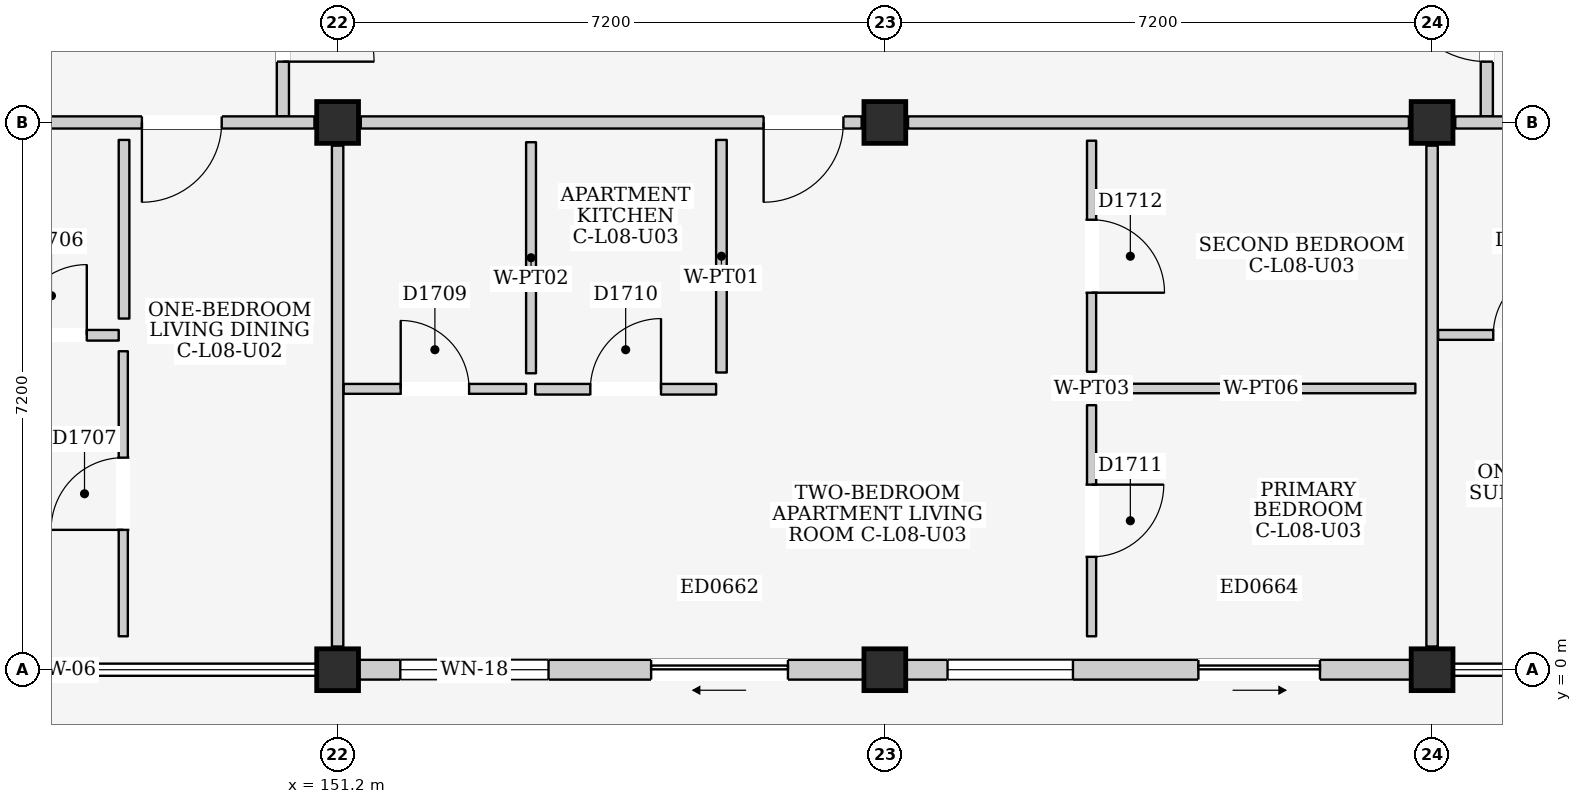
"""IFC4 building model, lengths in metres.
Left out: names, types, materials, properties, quantities, classifications, styles, units other than length and angle.
Written with IfcOpenShell. Run it as: python <this file> out.ifc"""

import sys

from ifc_helpers import new_model, si_unit, direction, frame, frame_2d, origin, origin_2d, place, context, subcontext, project, spatial, rectangle, extrude, element, fill, save


model = new_model("IFC4")
c1 = context("Model", 3, precision=1e-05, world=origin(), true_north=direction((0.0, 1.0)))
c2 = subcontext(c1, "Body", "Model", "MODEL_VIEW")
j1 = project(units=[si_unit("LENGTHUNIT", "METRE"), si_unit("PLANEANGLEUNIT", "RADIAN")], contexts=[c1])
p1 = place(None, origin())
s1 = spatial("IfcSite", under=j1, at=p1, CompositionType="ELEMENT")
p2 = place(p1, origin())
s2 = spatial("IfcBuilding", under=s1, at=p2, CompositionType="ELEMENT")
p3 = place(p2, frame((0.0, 0.0, 28.3)))
s3 = spatial("IfcBuildingStorey", under=s2, at=p3, CompositionType="ELEMENT", Elevation=28.3)
for number, where, z_axis, x_axis in (
    (1, (151.2, 0.0, 0.0), (0.0, 0.0, 1.0), (1.0, 0.0, 0.0)),
    (2, (151.2, 7.2, 0.0), (0.0, 0.0, 1.0), (1.0, 0.0, 0.0)),
    (3, (158.4, 0.0, 0.0), (0.0, 0.0, 1.0), (1.0, 0.0, 0.0)),
    (4, (158.4, 7.2, 0.0), (0.0, 0.0, 1.0), (1.0, 0.0, 0.0)),
    (5, (165.6, 0.0, 0.0), (0.0, 0.0, 1.0), (1.0, 0.0, 0.0)),
    (6, (165.6, 7.2, 0.0), (0.0, 0.0, 1.0), (1.0, 0.0, 0.0)),
):
    element("IfcColumn", number, at=place(p3, frame(where, z_axis=z_axis, x_axis=x_axis)), inside=s3, PredefinedType="COLUMN", context=c2, shape_type="SweptSolid", body=[
        extrude(rectangle(XDim=0.55, YDim=0.55, at=origin_2d()), origin(), (0.0, 0.0, 1.0), 3.2),
    ])
p4 = place(p3, frame((151.475, 0.0, 0.0), z_axis=(0.0, 0.0, 1.0), x_axis=(1.0, 0.0, 0.0)))
e7 = element("IfcWall", 7, at=p4, inside=s3, PredefinedType="ELEMENTEDWALL", context=c2, shape_type="SweptSolid", body=[
    extrude(rectangle(XDim=6.65, YDim=0.26, at=frame_2d((3.325, 0.0))), origin(), (0.0, 0.0, 1.0), 2.485),
])
p5 = place(p4, frame((3.85, 0.0, 0.0)))
e8 = element("IfcOpeningElement", 8, at=p5, cuts=e7, PredefinedType="OPENING", context=c2, shape_type="SweptSolid", body=[
    extrude(rectangle(XDim=1.8, YDim=2.12, at=frame_2d((0.9, 1.06))), frame((0.0, 0.145, 0.0), z_axis=(0.0, -1.0, 0.0), x_axis=(1.0, 0.0, 0.0)), (0.0, 0.0, 1.0), 0.29),
])
p6 = place(p4, frame((0.55, 0.0, 0.825)))
e9 = element("IfcOpeningElement", 9, at=p6, cuts=e7, PredefinedType="OPENING", context=c2, shape_type="SweptSolid", body=[
    extrude(rectangle(XDim=1.95, YDim=1.55, at=frame_2d((0.975, 0.775))), frame((0.0, 0.145, 0.0), z_axis=(0.0, -1.0, 0.0), x_axis=(1.0, 0.0, 0.0)), (0.0, 0.0, 1.0), 0.29),
])
p7 = place(p3, frame((158.675, 0.0, 0.0), z_axis=(0.0, 0.0, 1.0), x_axis=(1.0, 0.0, 0.0)))
e10 = element("IfcWall", 10, at=p7, inside=s3, PredefinedType="ELEMENTEDWALL", context=c2, shape_type="SweptSolid", body=[
    extrude(rectangle(XDim=6.65, YDim=0.26, at=frame_2d((3.325, 0.0))), origin(), (0.0, 0.0, 1.0), 2.485),
])
p8 = place(p7, frame((3.85, 0.0, 0.0)))
e11 = element("IfcOpeningElement", 11, at=p8, cuts=e10, PredefinedType="OPENING", context=c2, shape_type="SweptSolid", body=[
    extrude(rectangle(XDim=1.6, YDim=2.12, at=frame_2d((0.8, 1.06))), frame((0.0, 0.145, 0.0), z_axis=(0.0, -1.0, 0.0), x_axis=(1.0, 0.0, 0.0)), (0.0, 0.0, 1.0), 0.29),
])
p9 = place(p7, frame((0.55, 0.0, 0.9)))
e12 = element("IfcOpeningElement", 12, at=p9, cuts=e10, PredefinedType="OPENING", context=c2, shape_type="SweptSolid", body=[
    extrude(rectangle(XDim=1.65, YDim=1.35, at=frame_2d((0.825, 0.675))), frame((0.0, 0.145, 0.0), z_axis=(0.0, -1.0, 0.0), x_axis=(1.0, 0.0, 0.0)), (0.0, 0.0, 1.0), 0.29),
])
p10 = place(p3, frame((150.48, 7.28, 0.0), z_axis=(0.0, 0.0, 1.0), x_axis=(0.0, 1.0, 0.0)))
e13 = element("IfcWall", 13, at=p10, inside=s3, PredefinedType="PARTITIONING", context=c2, shape_type="SweptSolid", body=[
    extrude(rectangle(XDim=4.32, YDim=0.16, at=frame_2d((2.16, 0.0))), origin(), (0.0, 0.0, 1.0), 2.95),
])
p11 = place(p10, frame((0.72, 0.0, 0.0)))
e14 = element("IfcOpeningElement", 14, at=p11, cuts=e13, PredefinedType="OPENING", context=c2, shape_type="SweptSolid", body=[
    extrude(rectangle(XDim=1.2, YDim=2.2, at=frame_2d((0.6, 1.1))), frame((0.0, 0.095, 0.0), z_axis=(0.0, -1.0, 0.0), x_axis=(1.0, 0.0, 0.0)), (0.0, 0.0, 1.0), 0.19),
])
p12 = place(p3, frame((166.32, 7.28, 0.0), z_axis=(0.0, 0.0, 1.0), x_axis=(0.0, 1.0, 0.0)))
e15 = element("IfcWall", 15, at=p12, inside=s3, PredefinedType="PARTITIONING", context=c2, shape_type="SweptSolid", body=[
    extrude(rectangle(XDim=4.32, YDim=0.16, at=frame_2d((2.16, 0.0))), origin(), (0.0, 0.0, 1.0), 2.95),
])
p13 = place(p12, frame((0.72, 0.0, 0.0)))
e16 = element("IfcOpeningElement", 16, at=p13, cuts=e15, PredefinedType="OPENING", context=c2, shape_type="SweptSolid", body=[
    extrude(rectangle(XDim=1.2, YDim=2.2, at=frame_2d((0.6, 1.1))), frame((0.0, 0.095, 0.0), z_axis=(0.0, -1.0, 0.0), x_axis=(1.0, 0.0, 0.0)), (0.0, 0.0, 1.0), 0.19),
])
p14 = place(p3, frame((144.305, 7.2, 0.0), z_axis=(0.0, 0.0, 1.0), x_axis=(1.0, 0.0, 0.0)))
e17 = element("IfcWall", 17, at=p14, inside=s3, PredefinedType="PARTITIONING", context=c2, shape_type="SweptSolid", body=[
    extrude(rectangle(XDim=6.59, YDim=0.16, at=frame_2d((3.295, 0.0))), origin(), (0.0, 0.0, 1.0), 2.335),
])
p15 = place(p14, frame((4.32, 0.0, 0.0)))
e18 = element("IfcOpeningElement", 18, at=p15, cuts=e17, PredefinedType="OPENING", context=c2, shape_type="SweptSolid", body=[
    extrude(rectangle(XDim=1.05, YDim=2.15, at=frame_2d((0.525, 1.075))), frame((0.0, 0.095, 0.0), z_axis=(0.0, -1.0, 0.0), x_axis=(1.0, 0.0, 0.0)), (0.0, 0.0, 1.0), 0.19),
])
p16 = place(p3, frame((151.2, 0.305, 0.0), z_axis=(0.0, 0.0, 1.0), x_axis=(0.0, 1.0, 0.0)))
e19 = element("IfcWall", 19, at=p16, inside=s3, PredefinedType="PARTITIONING", context=c2, shape_type="SweptSolid", body=[
    extrude(rectangle(XDim=6.59, YDim=0.15, at=frame_2d((3.295, 0.0))), origin(), (0.0, 0.0, 1.0), 2.435),
])
p17 = place(p3, frame((146.55, 4.4, 0.0), z_axis=(0.0, 0.0, 1.0), x_axis=(1.0, 0.0, 0.0)))
e20 = element("IfcWall", 20, at=p17, inside=s3, PredefinedType="PARTITIONING", context=c2, shape_type="SweptSolid", body=[
    extrude(rectangle(XDim=1.77, YDim=0.14, at=frame_2d((0.885, 0.0))), origin(), (0.0, 0.0, 1.0), 2.95),
])
p18 = place(p17, frame((0.42, 0.0, 0.0)))
e21 = element("IfcOpeningElement", 21, at=p18, cuts=e20, PredefinedType="OPENING", context=c2, shape_type="SweptSolid", body=[
    extrude(rectangle(XDim=0.93, YDim=2.14, at=frame_2d((0.465, 1.07))), frame((0.0, 0.085, 0.0), z_axis=(0.0, -1.0, 0.0), x_axis=(1.0, 0.0, 0.0)), (0.0, 0.0, 1.0), 0.17),
])
p19 = place(p3, frame((148.39, 4.62, 0.0), z_axis=(0.0, 0.0, 1.0), x_axis=(0.0, 1.0, 0.0)))
e22 = element("IfcWall", 22, at=p19, inside=s3, PredefinedType="PARTITIONING", context=c2, shape_type="SweptSolid", body=[
    extrude(rectangle(XDim=2.35, YDim=0.14, at=frame_2d((1.175, 0.0))), origin(), (0.0, 0.0, 1.0), 2.95),
])
p20 = place(p3, frame((148.38, 0.44, 0.0), z_axis=(0.0, 0.0, 1.0), x_axis=(0.0, 1.0, 0.0)))
e23 = element("IfcWall", 23, at=p20, inside=s3, PredefinedType="PARTITIONING", context=c2, shape_type="SweptSolid", body=[
    extrude(rectangle(XDim=3.75, YDim=0.12, at=frame_2d((1.875, 0.0))), origin(), (0.0, 0.0, 1.0), 2.95),
])
p21 = place(p20, frame((1.4, 0.0, 0.0)))
e24 = element("IfcOpeningElement", 24, at=p21, cuts=e23, PredefinedType="OPENING", context=c2, shape_type="SweptSolid", body=[
    extrude(rectangle(XDim=0.95, YDim=2.15, at=frame_2d((0.475, 1.075))), frame((0.0, 0.075, 0.0), z_axis=(0.0, -1.0, 0.0), x_axis=(1.0, 0.0, 0.0)), (0.0, 0.0, 1.0), 0.15),
])
p22 = place(p3, frame((151.505, 7.2, 0.0), z_axis=(0.0, 0.0, 1.0), x_axis=(1.0, 0.0, 0.0)))
e25 = element("IfcWall", 25, at=p22, inside=s3, PredefinedType="PARTITIONING", context=c2, shape_type="SweptSolid", body=[
    extrude(rectangle(XDim=6.59, YDim=0.16, at=frame_2d((3.295, 0.0))), origin(), (0.0, 0.0, 1.0), 2.335),
])
p23 = place(p22, frame((5.3, 0.0, 0.0)))
e26 = element("IfcOpeningElement", 26, at=p23, cuts=e25, PredefinedType="OPENING", context=c2, shape_type="SweptSolid", body=[
    extrude(rectangle(XDim=1.05, YDim=2.15, at=frame_2d((0.525, 1.075))), frame((0.0, 0.095, 0.0), z_axis=(0.0, -1.0, 0.0), x_axis=(1.0, 0.0, 0.0)), (0.0, 0.0, 1.0), 0.19),
])
p24 = place(p3, frame((158.705, 7.2, 0.0), z_axis=(0.0, 0.0, 1.0), x_axis=(1.0, 0.0, 0.0)))
e27 = element("IfcWall", 27, at=p24, inside=s3, PredefinedType="PARTITIONING", context=c2, shape_type="SweptSolid", body=[
    extrude(rectangle(XDim=6.59, YDim=0.16, at=frame_2d((3.295, 0.0))), origin(), (0.0, 0.0, 1.0), 2.335),
])
p25 = place(p3, frame((165.6, 0.305, 0.0), z_axis=(0.0, 0.0, 1.0), x_axis=(0.0, 1.0, 0.0)))
e28 = element("IfcWall", 28, at=p25, inside=s3, PredefinedType="PARTITIONING", context=c2, shape_type="SweptSolid", body=[
    extrude(rectangle(XDim=6.59, YDim=0.15, at=frame_2d((3.295, 0.0))), origin(), (0.0, 0.0, 1.0), 2.435),
])
p26 = place(p3, frame((151.28, 3.695, 0.0), z_axis=(0.0, 0.0, 1.0), x_axis=(1.0, 0.0, 0.0)))
e29 = element("IfcWall", 29, at=p26, inside=s3, PredefinedType="PARTITIONING", context=c2, shape_type="SweptSolid", body=[
    extrude(rectangle(XDim=2.4, YDim=0.13, at=frame_2d((1.2, 0.0))), origin(), (0.0, 0.0, 1.0), 2.95),
])
p27 = place(p26, frame((0.75, 0.0, 0.0)))
e30 = element("IfcOpeningElement", 30, at=p27, cuts=e29, PredefinedType="OPENING", context=c2, shape_type="SweptSolid", body=[
    extrude(rectangle(XDim=0.9, YDim=2.1, at=frame_2d((0.45, 1.05))), frame((0.0, 0.08, 0.0), z_axis=(0.0, -1.0, 0.0), x_axis=(1.0, 0.0, 0.0)), (0.0, 0.0, 1.0), 0.16),
])
p28 = place(p3, frame((153.745, 3.9, 0.0), z_axis=(0.0, 0.0, 1.0), x_axis=(0.0, 1.0, 0.0)))
e31 = element("IfcWall", 31, at=p28, inside=s3, PredefinedType="PARTITIONING", context=c2, shape_type="SweptSolid", body=[
    extrude(rectangle(XDim=3.04, YDim=0.13, at=frame_2d((1.52, 0.0))), origin(), (0.0, 0.0, 1.0), 2.95),
])
p29 = place(p3, frame((153.8, 3.69, 0.0), z_axis=(0.0, 0.0, 1.0), x_axis=(1.0, 0.0, 0.0)))
e32 = element("IfcWall", 32, at=p29, inside=s3, PredefinedType="PARTITIONING", context=c2, shape_type="SweptSolid", body=[
    extrude(rectangle(XDim=2.38, YDim=0.14, at=frame_2d((1.19, 0.0))), origin(), (0.0, 0.0, 1.0), 2.95),
])
p30 = place(p29, frame((0.725, 0.0, 0.0)))
e33 = element("IfcOpeningElement", 33, at=p30, cuts=e32, PredefinedType="OPENING", context=c2, shape_type="SweptSolid", body=[
    extrude(rectangle(XDim=0.93, YDim=2.14, at=frame_2d((0.465, 1.07))), frame((0.0, 0.085, 0.0), z_axis=(0.0, -1.0, 0.0), x_axis=(1.0, 0.0, 0.0)), (0.0, 0.0, 1.0), 0.17),
])
p31 = place(p3, frame((156.25, 3.91, 0.0), z_axis=(0.0, 0.0, 1.0), x_axis=(0.0, 1.0, 0.0)))
e34 = element("IfcWall", 34, at=p31, inside=s3, PredefinedType="PARTITIONING", context=c2, shape_type="SweptSolid", body=[
    extrude(rectangle(XDim=3.06, YDim=0.14, at=frame_2d((1.53, 0.0))), origin(), (0.0, 0.0, 1.0), 2.95),
])
p32 = place(p3, frame((161.12, 0.44, 0.0), z_axis=(0.0, 0.0, 1.0), x_axis=(0.0, 1.0, 0.0)))
e35 = element("IfcWall", 35, at=p32, inside=s3, PredefinedType="PARTITIONING", context=c2, shape_type="SweptSolid", body=[
    extrude(rectangle(XDim=3.04, YDim=0.12, at=frame_2d((1.52, 0.0))), origin(), (0.0, 0.0, 1.0), 2.95),
])
p33 = place(p32, frame((1.045, 0.0, 0.0)))
e36 = element("IfcOpeningElement", 36, at=p33, cuts=e35, PredefinedType="OPENING", context=c2, shape_type="SweptSolid", body=[
    extrude(rectangle(XDim=0.95, YDim=2.15, at=frame_2d((0.475, 1.075))), frame((0.0, 0.075, 0.0), z_axis=(0.0, -1.0, 0.0), x_axis=(1.0, 0.0, 0.0)), (0.0, 0.0, 1.0), 0.15),
])
p34 = place(p3, frame((161.32, 3.7, 0.0), z_axis=(0.0, 0.0, 1.0), x_axis=(1.0, 0.0, 0.0)))
e37 = element("IfcWall", 37, at=p34, inside=s3, PredefinedType="PARTITIONING", context=c2, shape_type="SweptSolid", body=[
    extrude(rectangle(XDim=4.06, YDim=0.125, at=frame_2d((2.03, 0.0))), origin(), (0.0, 0.0, 1.0), 2.95),
])
p35 = place(p3, frame((161.12, 3.92, 0.0), z_axis=(0.0, 0.0, 1.0), x_axis=(0.0, 1.0, 0.0)))
e38 = element("IfcWall", 38, at=p35, inside=s3, PredefinedType="PARTITIONING", context=c2, shape_type="SweptSolid", body=[
    extrude(rectangle(XDim=3.04, YDim=0.12, at=frame_2d((1.52, 0.0))), origin(), (0.0, 0.0, 1.0), 2.95),
])
p36 = place(p35, frame((1.04, 0.0, 0.0)))
e39 = element("IfcOpeningElement", 39, at=p36, cuts=e38, PredefinedType="OPENING", context=c2, shape_type="SweptSolid", body=[
    extrude(rectangle(XDim=0.96, YDim=2.15, at=frame_2d((0.48, 1.075))), frame((0.0, 0.075, 0.0), z_axis=(0.0, -1.0, 0.0), x_axis=(1.0, 0.0, 0.0)), (0.0, 0.0, 1.0), 0.15),
])
p37 = place(p3, frame((165.905, 7.2, 0.0), z_axis=(0.0, 0.0, 1.0), x_axis=(1.0, 0.0, 0.0)))
e40 = element("IfcWall", 40, at=p37, inside=s3, PredefinedType="PARTITIONING", context=c2, shape_type="SweptSolid", body=[
    extrude(rectangle(XDim=6.59, YDim=0.16, at=frame_2d((3.295, 0.0))), origin(), (0.0, 0.0, 1.0), 2.335),
])
p38 = place(p37, frame((4.32, 0.0, 0.0)))
e41 = element("IfcOpeningElement", 41, at=p38, cuts=e40, PredefinedType="OPENING", context=c2, shape_type="SweptSolid", body=[
    extrude(rectangle(XDim=1.05, YDim=2.15, at=frame_2d((0.525, 1.075))), frame((0.0, 0.095, 0.0), z_axis=(0.0, -1.0, 0.0), x_axis=(1.0, 0.0, 0.0)), (0.0, 0.0, 1.0), 0.19),
])
p39 = place(p3, frame((165.68, 4.405, 0.0), z_axis=(0.0, 0.0, 1.0), x_axis=(1.0, 0.0, 0.0)))
e42 = element("IfcWall", 42, at=p39, inside=s3, PredefinedType="PARTITIONING", context=c2, shape_type="SweptSolid", body=[
    extrude(rectangle(XDim=2.35, YDim=0.13, at=frame_2d((1.175, 0.0))), origin(), (0.0, 0.0, 1.0), 2.95),
])
p40 = place(p39, frame((0.725, 0.0, 0.0)))
e43 = element("IfcOpeningElement", 43, at=p40, cuts=e42, PredefinedType="OPENING", context=c2, shape_type="SweptSolid", body=[
    extrude(rectangle(XDim=0.9, YDim=2.1, at=frame_2d((0.45, 1.05))), frame((0.0, 0.08, 0.0), z_axis=(0.0, -1.0, 0.0), x_axis=(1.0, 0.0, 0.0)), (0.0, 0.0, 1.0), 0.16),
])
p41 = place(p5, frame((1.8, 0.0, 0.0), z_axis=(0.0, 0.0, 1.0), x_axis=(-1.0, 0.0, 0.0)))
e44 = element("IfcDoor", 44, at=p41, inside=s3, OperationType="SLIDING_TO_LEFT", PredefinedType="DOOR", context=c2, shape_type="SweptSolid", body=[
    extrude(rectangle(XDim=1.8, YDim=2.12, at=frame_2d((0.9, 1.06))), frame((0.0, 0.025, 0.0), z_axis=(0.0, -1.0, 0.0), x_axis=(1.0, 0.0, 0.0)), (0.0, 0.0, 1.0), 0.05),
])
fill(e8, e44)
p42 = place(p6, origin())
e45 = element("IfcWindow", 45, at=p42, inside=s3, PartitioningType="DOUBLE_PANEL_VERTICAL", PredefinedType="WINDOW", context=c2, shape_type="SweptSolid", body=[
    extrude(rectangle(XDim=1.95, YDim=1.55, at=frame_2d((0.975, 0.775))), frame((0.0, 0.03, 0.0), z_axis=(0.0, -1.0, 0.0), x_axis=(1.0, 0.0, 0.0)), (0.0, 0.0, 1.0), 0.06),
])
fill(e9, e45)
p43 = place(p8, frame((1.6, 0.0, 0.0), z_axis=(0.0, 0.0, 1.0), x_axis=(-1.0, 0.0, 0.0)))
e46 = element("IfcDoor", 46, at=p43, inside=s3, OperationType="SLIDING_TO_RIGHT", PredefinedType="DOOR", context=c2, shape_type="SweptSolid", body=[
    extrude(rectangle(XDim=1.6, YDim=2.12, at=frame_2d((0.8, 1.06))), frame((0.0, 0.025, 0.0), z_axis=(0.0, -1.0, 0.0), x_axis=(1.0, 0.0, 0.0)), (0.0, 0.0, 1.0), 0.05),
])
fill(e11, e46)
p44 = place(p9, origin())
e47 = element("IfcWindow", 47, at=p44, inside=s3, PartitioningType="DOUBLE_PANEL_VERTICAL", PredefinedType="WINDOW", context=c2, shape_type="SweptSolid", body=[
    extrude(rectangle(XDim=1.65, YDim=1.35, at=frame_2d((0.825, 0.675))), frame((0.0, 0.03, 0.0), z_axis=(0.0, -1.0, 0.0), x_axis=(1.0, 0.0, 0.0)), (0.0, 0.0, 1.0), 0.06),
])
fill(e12, e47)
p45 = place(p11, frame((1.2, 0.0, 0.0), z_axis=(0.0, 0.0, 1.0), x_axis=(-1.0, 0.0, 0.0)))
e48 = element("IfcDoor", 48, at=p45, inside=s3, OperationType="SINGLE_SWING_RIGHT", PredefinedType="DOOR", context=c2, shape_type="SweptSolid", body=[
    extrude(rectangle(XDim=1.2, YDim=2.2, at=frame_2d((0.6, 1.1))), frame((0.0, 0.025, 0.0), z_axis=(0.0, -1.0, 0.0), x_axis=(1.0, 0.0, 0.0)), (0.0, 0.0, 1.0), 0.05),
])
fill(e14, e48)
p46 = place(p13, origin())
e49 = element("IfcDoor", 49, at=p46, inside=s3, OperationType="SINGLE_SWING_RIGHT", PredefinedType="DOOR", context=c2, shape_type="SweptSolid", body=[
    extrude(rectangle(XDim=1.2, YDim=2.2, at=frame_2d((0.6, 1.1))), frame((0.0, 0.025, 0.0), z_axis=(0.0, -1.0, 0.0), x_axis=(1.0, 0.0, 0.0)), (0.0, 0.0, 1.0), 0.05),
])
fill(e16, e49)
p47 = place(p15, frame((1.05, 0.0, 0.0), z_axis=(0.0, 0.0, 1.0), x_axis=(-1.0, 0.0, 0.0)))
e50 = element("IfcDoor", 50, at=p47, inside=s3, OperationType="SINGLE_SWING_RIGHT", PredefinedType="DOOR", context=c2, shape_type="SweptSolid", body=[
    extrude(rectangle(XDim=1.05, YDim=2.15, at=frame_2d((0.525, 1.075))), frame((0.0, 0.025, 0.0), z_axis=(0.0, -1.0, 0.0), x_axis=(1.0, 0.0, 0.0)), (0.0, 0.0, 1.0), 0.05),
])
fill(e18, e50)
p48 = place(p18, origin())
e51 = element("IfcDoor", 51, at=p48, inside=s3, OperationType="SINGLE_SWING_RIGHT", PredefinedType="DOOR", context=c2, shape_type="SweptSolid", body=[
    extrude(rectangle(XDim=0.93, YDim=2.14, at=frame_2d((0.465, 1.07))), frame((0.0, 0.025, 0.0), z_axis=(0.0, -1.0, 0.0), x_axis=(1.0, 0.0, 0.0)), (0.0, 0.0, 1.0), 0.05),
])
fill(e21, e51)
p49 = place(p21, origin())
e52 = element("IfcDoor", 52, at=p49, inside=s3, OperationType="SINGLE_SWING_LEFT", PredefinedType="DOOR", context=c2, shape_type="SweptSolid", body=[
    extrude(rectangle(XDim=0.95, YDim=2.15, at=frame_2d((0.475, 1.075))), frame((0.0, 0.025, 0.0), z_axis=(0.0, -1.0, 0.0), x_axis=(1.0, 0.0, 0.0)), (0.0, 0.0, 1.0), 0.05),
])
fill(e24, e52)
p50 = place(p23, frame((1.05, 0.0, 0.0), z_axis=(0.0, 0.0, 1.0), x_axis=(-1.0, 0.0, 0.0)))
e53 = element("IfcDoor", 53, at=p50, inside=s3, OperationType="SINGLE_SWING_RIGHT", PredefinedType="DOOR", context=c2, shape_type="SweptSolid", body=[
    extrude(rectangle(XDim=1.05, YDim=2.15, at=frame_2d((0.525, 1.075))), frame((0.0, 0.025, 0.0), z_axis=(0.0, -1.0, 0.0), x_axis=(1.0, 0.0, 0.0)), (0.0, 0.0, 1.0), 0.05),
])
fill(e26, e53)
p51 = place(p27, origin())
e54 = element("IfcDoor", 54, at=p51, inside=s3, OperationType="SINGLE_SWING_LEFT", PredefinedType="DOOR", context=c2, shape_type="SweptSolid", body=[
    extrude(rectangle(XDim=0.9, YDim=2.1, at=frame_2d((0.45, 1.05))), frame((0.0, 0.025, 0.0), z_axis=(0.0, -1.0, 0.0), x_axis=(1.0, 0.0, 0.0)), (0.0, 0.0, 1.0), 0.05),
])
fill(e30, e54)
p52 = place(p30, origin())
e55 = element("IfcDoor", 55, at=p52, inside=s3, OperationType="SINGLE_SWING_RIGHT", PredefinedType="DOOR", context=c2, shape_type="SweptSolid", body=[
    extrude(rectangle(XDim=0.93, YDim=2.14, at=frame_2d((0.465, 1.07))), frame((0.0, 0.025, 0.0), z_axis=(0.0, -1.0, 0.0), x_axis=(1.0, 0.0, 0.0)), (0.0, 0.0, 1.0), 0.05),
])
fill(e33, e55)
p53 = place(p33, frame((0.95, 0.0, 0.0), z_axis=(0.0, 0.0, 1.0), x_axis=(-1.0, 0.0, 0.0)))
e56 = element("IfcDoor", 56, at=p53, inside=s3, OperationType="SINGLE_SWING_LEFT", PredefinedType="DOOR", context=c2, shape_type="SweptSolid", body=[
    extrude(rectangle(XDim=0.95, YDim=2.15, at=frame_2d((0.475, 1.075))), frame((0.0, 0.025, 0.0), z_axis=(0.0, -1.0, 0.0), x_axis=(1.0, 0.0, 0.0)), (0.0, 0.0, 1.0), 0.05),
])
fill(e36, e56)
p54 = place(p36, frame((0.96, 0.0, 0.0), z_axis=(0.0, 0.0, 1.0), x_axis=(-1.0, 0.0, 0.0)))
e57 = element("IfcDoor", 57, at=p54, inside=s3, OperationType="SINGLE_SWING_RIGHT", PredefinedType="DOOR", context=c2, shape_type="SweptSolid", body=[
    extrude(rectangle(XDim=0.96, YDim=2.15, at=frame_2d((0.48, 1.075))), frame((0.0, 0.025, 0.0), z_axis=(0.0, -1.0, 0.0), x_axis=(1.0, 0.0, 0.0)), (0.0, 0.0, 1.0), 0.05),
])
fill(e39, e57)
p55 = place(p40, origin())
e58 = element("IfcDoor", 58, at=p55, inside=s3, OperationType="SINGLE_SWING_RIGHT", PredefinedType="DOOR", context=c2, shape_type="SweptSolid", body=[
    extrude(rectangle(XDim=0.9, YDim=2.1, at=frame_2d((0.45, 1.05))), frame((0.0, 0.025, 0.0), z_axis=(0.0, -1.0, 0.0), x_axis=(1.0, 0.0, 0.0)), (0.0, 0.0, 1.0), 0.05),
])
fill(e43, e58)
save(model, sys.argv[1])
